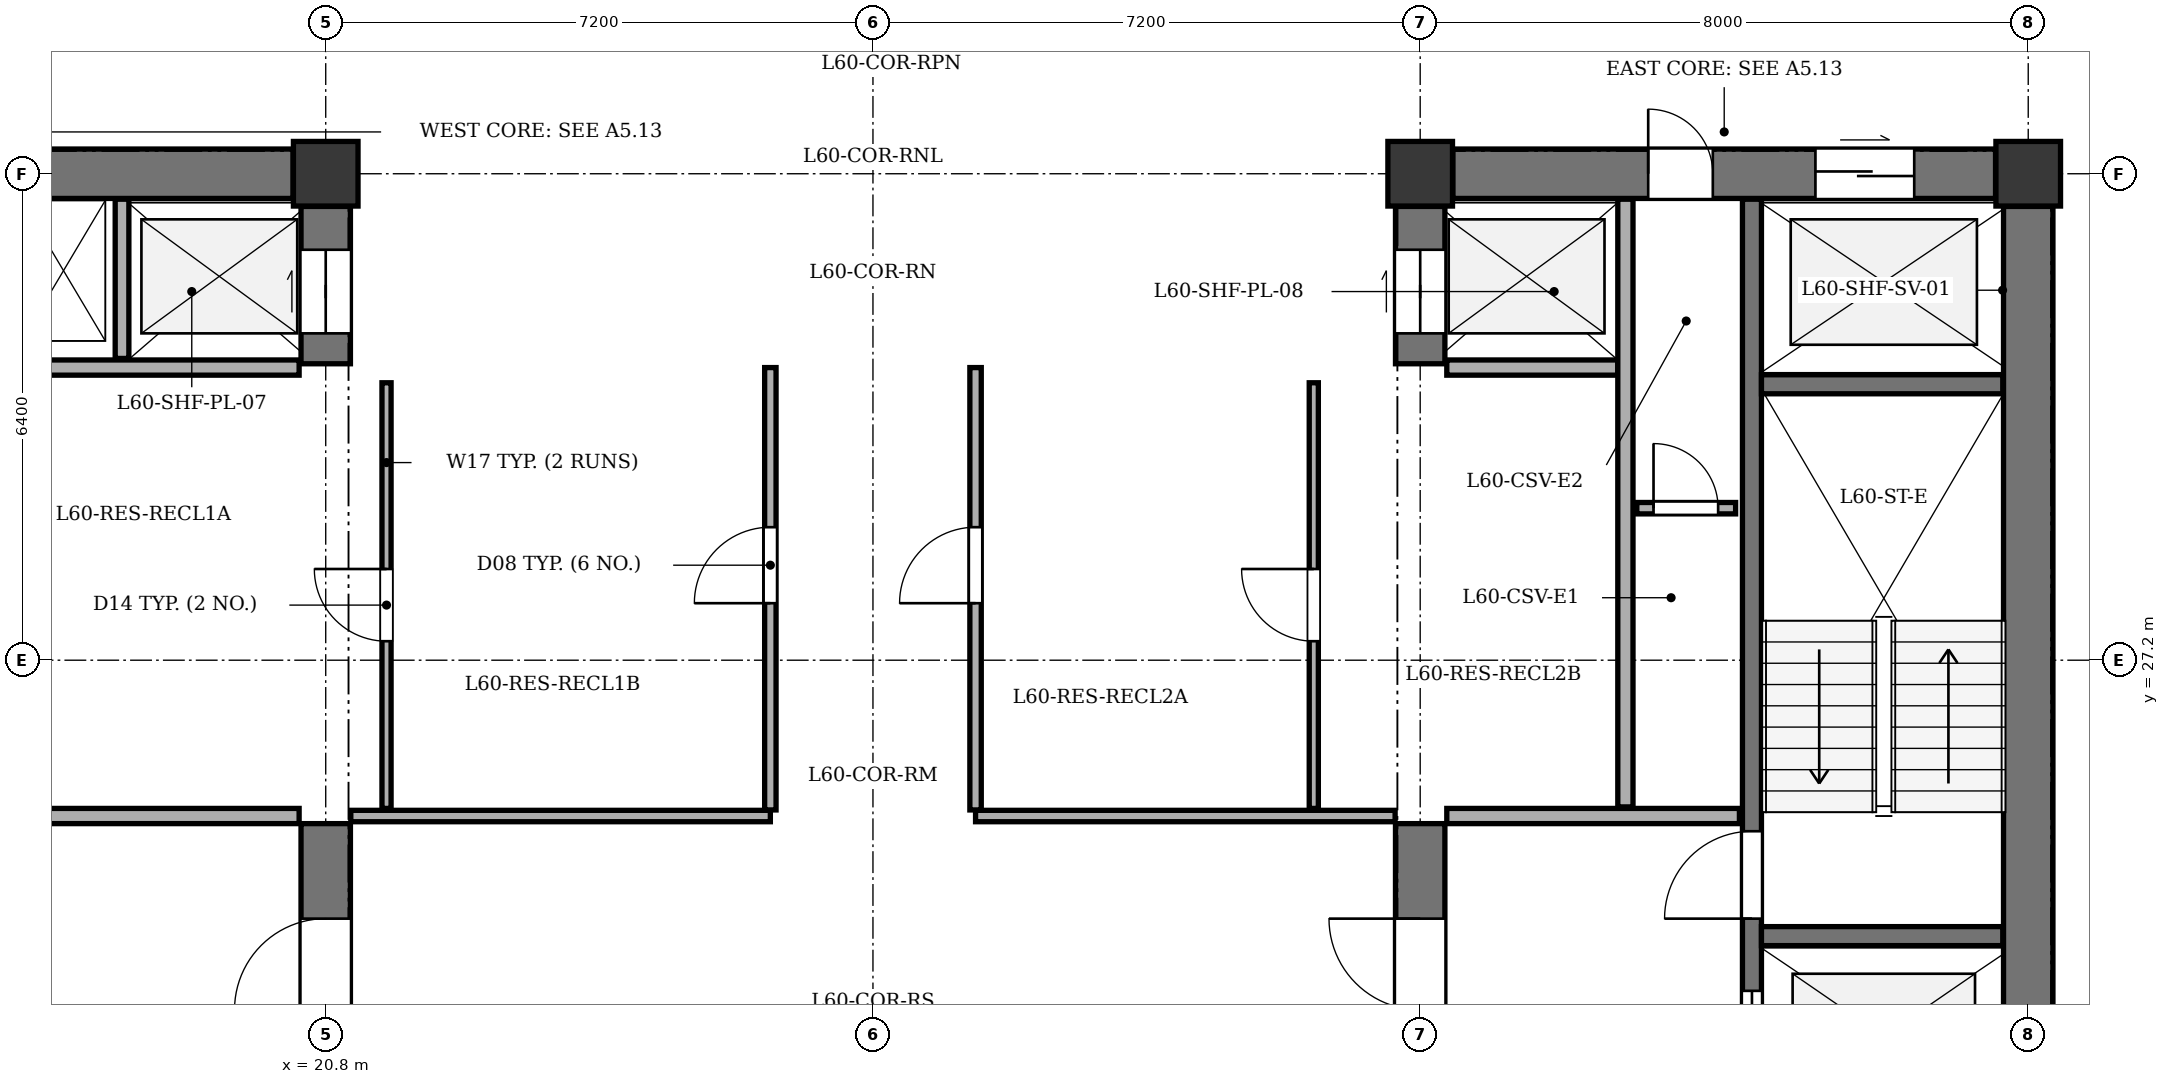
"""IFC4 building model, lengths in metres.
Left out: names, types, materials, properties, quantities, classifications, styles, units other than length and angle.
Written with IfcOpenShell. Run it as: python <this file> out.ifc"""

import sys

from ifc_helpers import new_model, si_unit, direction, frame, frame_2d, origin, origin_2d, place, context, subcontext, project, spatial, rectangle, extrude, element, fill, save


model = new_model("IFC4")
c1 = context("Model", 3, precision=1e-05, world=origin(), true_north=direction((0.0, 1.0)))
c2 = subcontext(c1, "Body", "Model", "MODEL_VIEW")
j1 = project(units=[si_unit("LENGTHUNIT", "METRE"), si_unit("PLANEANGLEUNIT", "RADIAN")], contexts=[c1])
p1 = place(None, origin())
s1 = spatial("IfcSite", under=j1, at=p1, CompositionType="ELEMENT")
p2 = place(p1, origin())
s2 = spatial("IfcBuilding", under=s1, at=p2, CompositionType="ELEMENT")
p3 = place(p2, frame((0.0, 0.0, 231.3)))
s3 = spatial("IfcBuildingStorey", under=s2, at=p3, CompositionType="ELEMENT", Elevation=231.3)
for number, where, z_axis, x_axis in (
    (1, (20.8, 33.6, 0.0), (0.0, 0.0, 1.0), (1.0, 0.0, 0.0)),
    (2, (35.2, 33.6, 0.0), (0.0, 0.0, 1.0), (1.0, 0.0, 0.0)),
    (3, (43.2, 33.6, 0.0), (0.0, 0.0, 1.0), (1.0, 0.0, 0.0)),
):
    element("IfcColumn", number, at=place(p3, frame(where, z_axis=z_axis, x_axis=x_axis)), inside=s3, PredefinedType="COLUMN", context=c2, shape_type="SweptSolid", body=[
        extrude(rectangle(XDim=0.85, YDim=0.85, at=origin_2d()), origin(), (0.0, 0.0, 1.0), 3.4),
    ])
p4 = place(p3, frame((13.23, 33.6, 0.0), z_axis=(0.0, 0.0, 1.0), x_axis=(1.0, 0.0, 0.0)))
e4 = element("IfcWall", 4, at=p4, inside=s3, PredefinedType="SHEAR", context=c2, shape_type="SweptSolid", body=[
    extrude(rectangle(XDim=7.14, YDim=0.65, at=frame_2d((3.57, 0.0))), origin(), (0.0, 0.0, 1.0), 3.1),
])
p5 = place(p4, frame((2.14, 0.0, 0.0)))
e5 = element("IfcOpeningElement", 5, at=p5, cuts=e4, PredefinedType="OPENING", context=c2, shape_type="SweptSolid", body=[
    extrude(rectangle(XDim=0.85, YDim=2.02, at=frame_2d((0.425, 1.01))), frame((0.0, 0.335, 0.0), z_axis=(0.0, -1.0, 0.0), x_axis=(1.0, 0.0, 0.0)), (0.0, 0.0, 1.0), 0.67),
])
p6 = place(p3, frame((20.8, 21.23, 0.0), z_axis=(0.0, 0.0, 1.0), x_axis=(0.0, 1.0, 0.0)))
e6 = element("IfcWall", 6, at=p6, inside=s3, PredefinedType="SHEAR", context=c2, shape_type="SweptSolid", body=[
    extrude(rectangle(XDim=3.82, YDim=0.65, at=frame_2d((1.91, 0.0))), origin(), (0.0, 0.0, 1.0), 3.1),
])
p7 = place(p6, frame((1.37, 0.0, 0.0)))
e7 = element("IfcOpeningElement", 7, at=p7, cuts=e6, PredefinedType="OPENING", context=c2, shape_type="SweptSolid", body=[
    extrude(rectangle(XDim=1.2, YDim=2.15, at=frame_2d((0.6, 1.075))), frame((0.0, 0.335, 0.0), z_axis=(0.0, -1.0, 0.0), x_axis=(1.0, 0.0, 0.0)), (0.0, 0.0, 1.0), 0.67),
])
p8 = place(p3, frame((20.8, 31.1, 0.0), z_axis=(0.0, 0.0, 1.0), x_axis=(0.0, 1.0, 0.0)))
e8 = element("IfcWall", 8, at=p8, inside=s3, PredefinedType="SHEAR", context=c2, shape_type="SweptSolid", body=[
    extrude(rectangle(XDim=2.07, YDim=0.65, at=frame_2d((1.035, 0.0))), origin(), (0.0, 0.0, 1.0), 3.1),
])
p9 = place(p8, frame((0.4, 0.0, 0.0)))
e9 = element("IfcOpeningElement", 9, at=p9, cuts=e8, PredefinedType="OPENING", context=c2, shape_type="SweptSolid", body=[
    extrude(rectangle(XDim=1.1, YDim=2.1, at=frame_2d((0.55, 1.05))), frame((0.0, 0.335, 0.0), z_axis=(0.0, -1.0, 0.0), x_axis=(1.0, 0.0, 0.0)), (0.0, 0.0, 1.0), 0.67),
])
for number, where, z_axis, x_axis in (
    (10, (16.6, 25.15, 0.0), (0.0, 0.0, 1.0), (1.0, 0.0, 0.0)),
    (11, (16.6, 31.05, 0.0), (0.0, 0.0, 1.0), (1.0, 0.0, 0.0)),
):
    element("IfcWall", number, at=place(p3, frame(where, z_axis=z_axis, x_axis=x_axis)), inside=s3, PredefinedType="SOLIDWALL", context=c2, shape_type="SweptSolid", body=[
        extrude(rectangle(XDim=3.85, YDim=0.2, at=frame_2d((1.925, 0.0))), origin(), (0.0, 0.0, 1.0), 3.1),
    ])
p10 = place(p3, frame((18.12, 31.17, 0.0), z_axis=(0.0, 0.0, 1.0), x_axis=(0.0, 1.0, 0.0)))
e12 = element("IfcWall", 12, at=p10, inside=s3, PredefinedType="PARTITIONING", context=c2, shape_type="SweptSolid", body=[
    extrude(rectangle(XDim=2.095, YDim=0.18, at=frame_2d((1.047, 0.0))), origin(), (0.0, 0.0, 1.0), 3.1),
])
p11 = place(p3, frame((43.2, 21.23, 0.0), z_axis=(0.0, 0.0, 1.0), x_axis=(0.0, 1.0, 0.0)))
e13 = element("IfcWall", 13, at=p11, inside=s3, PredefinedType="SHEAR", context=c2, shape_type="SweptSolid", body=[
    extrude(rectangle(XDim=11.94, YDim=0.65, at=frame_2d((5.97, 0.0))), origin(), (0.0, 0.0, 1.0), 3.1),
])
p12 = place(p3, frame((35.63, 33.6, 0.0), z_axis=(0.0, 0.0, 1.0), x_axis=(1.0, 0.0, 0.0)))
e14 = element("IfcWall", 14, at=p12, inside=s3, PredefinedType="SHEAR", context=c2, shape_type="SweptSolid", body=[
    extrude(rectangle(XDim=7.14, YDim=0.65, at=frame_2d((3.57, 0.0))), origin(), (0.0, 0.0, 1.0), 3.1),
])
p13 = place(p12, frame((4.77, 0.0, 0.0)))
e15 = element("IfcOpeningElement", 15, at=p13, cuts=e14, PredefinedType="OPENING", context=c2, shape_type="SweptSolid", body=[
    extrude(rectangle(XDim=1.3, YDim=2.15, at=frame_2d((0.65, 1.075))), frame((0.0, 0.335, 0.0), z_axis=(0.0, -1.0, 0.0), x_axis=(1.0, 0.0, 0.0)), (0.0, 0.0, 1.0), 0.67),
])
p14 = place(p12, frame((2.57, 0.0, 0.0)))
e16 = element("IfcOpeningElement", 16, at=p14, cuts=e14, PredefinedType="OPENING", context=c2, shape_type="SweptSolid", body=[
    extrude(rectangle(XDim=0.85, YDim=2.02, at=frame_2d((0.425, 1.01))), frame((0.0, 0.335, 0.0), z_axis=(0.0, -1.0, 0.0), x_axis=(1.0, 0.0, 0.0)), (0.0, 0.0, 1.0), 0.67),
])
p15 = place(p3, frame((35.2, 21.23, 0.0), z_axis=(0.0, 0.0, 1.0), x_axis=(0.0, 1.0, 0.0)))
e17 = element("IfcWall", 17, at=p15, inside=s3, PredefinedType="SHEAR", context=c2, shape_type="SweptSolid", body=[
    extrude(rectangle(XDim=3.82, YDim=0.65, at=frame_2d((1.91, 0.0))), origin(), (0.0, 0.0, 1.0), 3.1),
])
p16 = place(p15, frame((1.37, 0.0, 0.0)))
e18 = element("IfcOpeningElement", 18, at=p16, cuts=e17, PredefinedType="OPENING", context=c2, shape_type="SweptSolid", body=[
    extrude(rectangle(XDim=1.2, YDim=2.15, at=frame_2d((0.6, 1.075))), frame((0.0, 0.335, 0.0), z_axis=(0.0, -1.0, 0.0), x_axis=(1.0, 0.0, 0.0)), (0.0, 0.0, 1.0), 0.67),
])
p17 = place(p3, frame((35.2, 31.1, 0.0), z_axis=(0.0, 0.0, 1.0), x_axis=(0.0, 1.0, 0.0)))
e19 = element("IfcWall", 19, at=p17, inside=s3, PredefinedType="SHEAR", context=c2, shape_type="SweptSolid", body=[
    extrude(rectangle(XDim=2.07, YDim=0.65, at=frame_2d((1.035, 0.0))), origin(), (0.0, 0.0, 1.0), 3.1),
])
p18 = place(p17, frame((0.4, 0.0, 0.0)))
e20 = element("IfcOpeningElement", 20, at=p18, cuts=e19, PredefinedType="OPENING", context=c2, shape_type="SweptSolid", body=[
    extrude(rectangle(XDim=1.1, YDim=2.1, at=frame_2d((0.55, 1.05))), frame((0.0, 0.335, 0.0), z_axis=(0.0, -1.0, 0.0), x_axis=(1.0, 0.0, 0.0)), (0.0, 0.0, 1.0), 0.67),
])
p19 = place(p3, frame((39.565, 21.135, 0.0), z_axis=(0.0, 0.0, 1.0), x_axis=(0.0, 1.0, 0.0)))
e21 = element("IfcWall", 21, at=p19, inside=s3, PredefinedType="SHEAR", context=c2, shape_type="SweptSolid", body=[
    extrude(rectangle(XDim=12.13, YDim=0.25, at=frame_2d((6.065, 0.0))), origin(), (0.0, 0.0, 1.0), 3.1),
])
p20 = place(p19, frame((0.515, 0.0, 0.0)))
e22 = element("IfcOpeningElement", 22, at=p20, cuts=e21, PredefinedType="OPENING", context=c2, shape_type="SweptSolid", body=[
    extrude(rectangle(XDim=1.2, YDim=2.15, at=frame_2d((0.6, 1.075))), frame((0.0, 0.135, 0.0), z_axis=(0.0, -1.0, 0.0), x_axis=(1.0, 0.0, 0.0)), (0.0, 0.0, 1.0), 0.27),
])
p21 = place(p19, frame((2.665, 0.0, 0.0)))
e23 = element("IfcOpeningElement", 23, at=p21, cuts=e21, PredefinedType="OPENING", context=c2, shape_type="SweptSolid", body=[
    extrude(rectangle(XDim=1.15, YDim=2.15, at=frame_2d((0.575, 1.075))), frame((0.0, 0.135, 0.0), z_axis=(0.0, -1.0, 0.0), x_axis=(1.0, 0.0, 0.0)), (0.0, 0.0, 1.0), 0.27),
])
for number, where, z_axis, x_axis in (
    (24, (39.69, 23.57, 0.0), (0.0, 0.0, 1.0), (1.0, 0.0, 0.0)),
    (25, (39.69, 30.83, 0.0), (0.0, 0.0, 1.0), (1.0, 0.0, 0.0)),
):
    element("IfcWall", number, at=place(p3, frame(where, z_axis=z_axis, x_axis=x_axis)), inside=s3, PredefinedType="SHEAR", context=c2, shape_type="SweptSolid", body=[
        extrude(rectangle(XDim=3.175, YDim=0.25, at=frame_2d((1.587, 0.0))), origin(), (0.0, 0.0, 1.0), 3.1),
    ])
p22 = place(p3, frame((35.55, 25.15, 0.0), z_axis=(0.0, 0.0, 1.0), x_axis=(1.0, 0.0, 0.0)))
e26 = element("IfcWall", 26, at=p22, inside=s3, PredefinedType="SOLIDWALL", context=c2, shape_type="SweptSolid", body=[
    extrude(rectangle(XDim=3.85, YDim=0.2, at=frame_2d((1.925, 0.0))), origin(), (0.0, 0.0, 1.0), 3.1),
])
p23 = place(p3, frame((35.55, 31.05, 0.0), z_axis=(0.0, 0.0, 1.0), x_axis=(1.0, 0.0, 0.0)))
e27 = element("IfcWall", 27, at=p23, inside=s3, PredefinedType="SOLIDWALL", context=c2, shape_type="SweptSolid", body=[
    extrude(rectangle(XDim=2.25, YDim=0.2, at=frame_2d((1.125, 0.0))), origin(), (0.0, 0.0, 1.0), 3.1),
])
p24 = place(p3, frame((37.9, 25.27, 0.0), z_axis=(0.0, 0.0, 1.0), x_axis=(0.0, 1.0, 0.0)))
e28 = element("IfcWall", 28, at=p24, inside=s3, PredefinedType="SOLIDWALL", context=c2, shape_type="SweptSolid", body=[
    extrude(rectangle(XDim=7.995, YDim=0.2, at=frame_2d((3.998, 0.0))), origin(), (0.0, 0.0, 1.0), 3.1),
])
p25 = place(p3, frame((38.05, 29.2, 0.0), z_axis=(0.0, 0.0, 1.0), x_axis=(1.0, 0.0, 0.0)))
e29 = element("IfcWall", 29, at=p25, inside=s3, PredefinedType="PARTITIONING", context=c2, shape_type="SweptSolid", body=[
    extrude(rectangle(XDim=1.3, YDim=0.15, at=frame_2d((0.65, 0.0))), origin(), (0.0, 0.0, 1.0), 3.1),
])
p26 = place(p25, frame((0.22, 0.0, 0.0)))
e30 = element("IfcOpeningElement", 30, at=p26, cuts=e29, PredefinedType="OPENING", context=c2, shape_type="SweptSolid", body=[
    extrude(rectangle(XDim=0.85, YDim=2.02, at=frame_2d((0.425, 1.01))), frame((0.0, 0.085, 0.0), z_axis=(0.0, -1.0, 0.0), x_axis=(1.0, 0.0, 0.0)), (0.0, 0.0, 1.0), 0.17),
])
for number, where, z_axis, x_axis in (
    (31, (21.13, 25.15, 0.0), (0.0, 0.0, 1.0), (1.0, 0.0, 0.0)),
    (32, (29.35, 25.15, 0.0), (0.0, 0.0, 1.0), (1.0, 0.0, 0.0)),
):
    element("IfcWall", number, at=place(p3, frame(where, z_axis=z_axis, x_axis=x_axis)), inside=s3, PredefinedType="PARTITIONING", context=c2, shape_type="SweptSolid", body=[
        extrude(rectangle(XDim=5.52, YDim=0.15, at=frame_2d((2.76, 0.0))), origin(), (0.0, 0.0, 1.0), 3.1),
    ])
p27 = place(p3, frame((26.65, 25.23, 0.0), z_axis=(0.0, 0.0, 1.0), x_axis=(0.0, 1.0, 0.0)))
e33 = element("IfcWall", 33, at=p27, inside=s3, PredefinedType="PARTITIONING", context=c2, shape_type="SweptSolid", body=[
    extrude(rectangle(XDim=5.82, YDim=0.15, at=frame_2d((2.91, 0.0))), origin(), (0.0, 0.0, 1.0), 3.1),
])
p28 = place(p27, frame((2.72, 0.0, 0.0)))
e34 = element("IfcOpeningElement", 34, at=p28, cuts=e33, PredefinedType="OPENING", context=c2, shape_type="SweptSolid", body=[
    extrude(rectangle(XDim=1.0, YDim=2.1, at=frame_2d((0.5, 1.05))), frame((0.0, 0.085, 0.0), z_axis=(0.0, -1.0, 0.0), x_axis=(1.0, 0.0, 0.0)), (0.0, 0.0, 1.0), 0.17),
])
p29 = place(p3, frame((21.6, 25.25, 0.0), z_axis=(0.0, 0.0, 1.0), x_axis=(0.0, 1.0, 0.0)))
e35 = element("IfcWall", 35, at=p29, inside=s3, PredefinedType="PARTITIONING", context=c2, shape_type="SweptSolid", body=[
    extrude(rectangle(XDim=5.6, YDim=0.12, at=frame_2d((2.8, 0.0))), origin(), (0.0, 0.0, 1.0), 3.1),
])
p30 = place(p29, frame((2.2, 0.0, 0.0)))
e36 = element("IfcOpeningElement", 36, at=p30, cuts=e35, PredefinedType="OPENING", context=c2, shape_type="SweptSolid", body=[
    extrude(rectangle(XDim=0.95, YDim=2.1, at=frame_2d((0.475, 1.05))), frame((0.0, 0.07, 0.0), z_axis=(0.0, -1.0, 0.0), x_axis=(1.0, 0.0, 0.0)), (0.0, 0.0, 1.0), 0.14),
])
p31 = place(p3, frame((29.35, 25.23, 0.0), z_axis=(0.0, 0.0, 1.0), x_axis=(0.0, 1.0, 0.0)))
e37 = element("IfcWall", 37, at=p31, inside=s3, PredefinedType="PARTITIONING", context=c2, shape_type="SweptSolid", body=[
    extrude(rectangle(XDim=5.82, YDim=0.15, at=frame_2d((2.91, 0.0))), origin(), (0.0, 0.0, 1.0), 3.1),
])
p32 = place(p31, frame((2.72, 0.0, 0.0)))
e38 = element("IfcOpeningElement", 38, at=p32, cuts=e37, PredefinedType="OPENING", context=c2, shape_type="SweptSolid", body=[
    extrude(rectangle(XDim=1.0, YDim=2.1, at=frame_2d((0.5, 1.05))), frame((0.0, 0.085, 0.0), z_axis=(0.0, -1.0, 0.0), x_axis=(1.0, 0.0, 0.0)), (0.0, 0.0, 1.0), 0.17),
])
p33 = place(p3, frame((33.8, 25.25, 0.0), z_axis=(0.0, 0.0, 1.0), x_axis=(0.0, 1.0, 0.0)))
e39 = element("IfcWall", 39, at=p33, inside=s3, PredefinedType="PARTITIONING", context=c2, shape_type="SweptSolid", body=[
    extrude(rectangle(XDim=5.6, YDim=0.12, at=frame_2d((2.8, 0.0))), origin(), (0.0, 0.0, 1.0), 3.1),
])
p34 = place(p33, frame((2.2, 0.0, 0.0)))
e40 = element("IfcOpeningElement", 40, at=p34, cuts=e39, PredefinedType="OPENING", context=c2, shape_type="SweptSolid", body=[
    extrude(rectangle(XDim=0.95, YDim=2.1, at=frame_2d((0.475, 1.05))), frame((0.0, 0.07, 0.0), z_axis=(0.0, -1.0, 0.0), x_axis=(1.0, 0.0, 0.0)), (0.0, 0.0, 1.0), 0.14),
])
p35 = place(p7, origin())
e41 = element("IfcDoor", 41, at=p35, inside=s3, OperationType="SINGLE_SWING_LEFT", PredefinedType="DOOR", context=c2, shape_type="SweptSolid", body=[
    extrude(rectangle(XDim=1.2, YDim=2.15, at=frame_2d((0.6, 1.075))), frame((0.0, 0.025, 0.0), z_axis=(0.0, -1.0, 0.0), x_axis=(1.0, 0.0, 0.0)), (0.0, 0.0, 1.0), 0.05),
])
fill(e7, e41)
p36 = place(p9, origin())
e42 = element("IfcDoor", 42, at=p36, inside=s3, OperationType="DOUBLE_DOOR_SLIDING", PredefinedType="DOOR", context=c2, shape_type="SweptSolid", body=[
    extrude(rectangle(XDim=1.1, YDim=2.1, at=frame_2d((0.55, 1.05))), frame((0.0, 0.025, 0.0), z_axis=(0.0, -1.0, 0.0), x_axis=(1.0, 0.0, 0.0)), (0.0, 0.0, 1.0), 0.05),
])
fill(e9, e42)
p37 = place(p13, origin())
e43 = element("IfcDoor", 43, at=p37, inside=s3, OperationType="DOUBLE_DOOR_SLIDING", PredefinedType="DOOR", context=c2, shape_type="SweptSolid", body=[
    extrude(rectangle(XDim=1.3, YDim=2.15, at=frame_2d((0.65, 1.075))), frame((0.0, 0.025, 0.0), z_axis=(0.0, -1.0, 0.0), x_axis=(1.0, 0.0, 0.0)), (0.0, 0.0, 1.0), 0.05),
])
fill(e15, e43)
p38 = place(p14, origin())
e44 = element("IfcDoor", 44, at=p38, inside=s3, OperationType="SINGLE_SWING_LEFT", PredefinedType="DOOR", context=c2, shape_type="SweptSolid", body=[
    extrude(rectangle(XDim=0.85, YDim=2.02, at=frame_2d((0.425, 1.01))), frame((0.0, 0.025, 0.0), z_axis=(0.0, -1.0, 0.0), x_axis=(1.0, 0.0, 0.0)), (0.0, 0.0, 1.0), 0.05),
])
fill(e16, e44)
p39 = place(p16, origin())
e45 = element("IfcDoor", 45, at=p39, inside=s3, OperationType="SINGLE_SWING_RIGHT", PredefinedType="DOOR", context=c2, shape_type="SweptSolid", body=[
    extrude(rectangle(XDim=1.2, YDim=2.15, at=frame_2d((0.6, 1.075))), frame((0.0, 0.025, 0.0), z_axis=(0.0, -1.0, 0.0), x_axis=(1.0, 0.0, 0.0)), (0.0, 0.0, 1.0), 0.05),
])
fill(e18, e45)
p40 = place(p18, origin())
e46 = element("IfcDoor", 46, at=p40, inside=s3, OperationType="DOUBLE_DOOR_SLIDING", PredefinedType="DOOR", context=c2, shape_type="SweptSolid", body=[
    extrude(rectangle(XDim=1.1, YDim=2.1, at=frame_2d((0.55, 1.05))), frame((0.0, 0.025, 0.0), z_axis=(0.0, -1.0, 0.0), x_axis=(1.0, 0.0, 0.0)), (0.0, 0.0, 1.0), 0.05),
])
fill(e20, e46)
p41 = place(p20, origin())
e47 = element("IfcDoor", 47, at=p41, inside=s3, OperationType="DOUBLE_DOOR_SLIDING", PredefinedType="DOOR", context=c2, shape_type="SweptSolid", body=[
    extrude(rectangle(XDim=1.2, YDim=2.15, at=frame_2d((0.6, 1.075))), frame((0.0, 0.025, 0.0), z_axis=(0.0, -1.0, 0.0), x_axis=(1.0, 0.0, 0.0)), (0.0, 0.0, 1.0), 0.05),
])
fill(e22, e47)
p42 = place(p21, origin())
e48 = element("IfcDoor", 48, at=p42, inside=s3, OperationType="SINGLE_SWING_LEFT", PredefinedType="DOOR", context=c2, shape_type="SweptSolid", body=[
    extrude(rectangle(XDim=1.15, YDim=2.15, at=frame_2d((0.575, 1.075))), frame((0.0, 0.025, 0.0), z_axis=(0.0, -1.0, 0.0), x_axis=(1.0, 0.0, 0.0)), (0.0, 0.0, 1.0), 0.05),
])
fill(e23, e48)
p43 = place(p26, origin())
e49 = element("IfcDoor", 49, at=p43, inside=s3, OperationType="SINGLE_SWING_LEFT", PredefinedType="DOOR", context=c2, shape_type="SweptSolid", body=[
    extrude(rectangle(XDim=0.85, YDim=2.02, at=frame_2d((0.425, 1.01))), frame((0.0, 0.025, 0.0), z_axis=(0.0, -1.0, 0.0), x_axis=(1.0, 0.0, 0.0)), (0.0, 0.0, 1.0), 0.05),
])
fill(e30, e49)
p44 = place(p30, origin())
e50 = element("IfcDoor", 50, at=p44, inside=s3, OperationType="SINGLE_SWING_RIGHT", PredefinedType="DOOR", context=c2, shape_type="SweptSolid", body=[
    extrude(rectangle(XDim=0.95, YDim=2.1, at=frame_2d((0.475, 1.05))), frame((0.0, 0.025, 0.0), z_axis=(0.0, -1.0, 0.0), x_axis=(1.0, 0.0, 0.0)), (0.0, 0.0, 1.0), 0.05),
])
fill(e36, e50)
p45 = place(p28, origin())
e51 = element("IfcDoor", 51, at=p45, inside=s3, OperationType="SINGLE_SWING_LEFT", PredefinedType="DOOR", context=c2, shape_type="SweptSolid", body=[
    extrude(rectangle(XDim=1.0, YDim=2.1, at=frame_2d((0.5, 1.05))), frame((0.0, 0.025, 0.0), z_axis=(0.0, -1.0, 0.0), x_axis=(1.0, 0.0, 0.0)), (0.0, 0.0, 1.0), 0.05),
])
fill(e34, e51)
p46 = place(p34, origin())
e52 = element("IfcDoor", 52, at=p46, inside=s3, OperationType="SINGLE_SWING_RIGHT", PredefinedType="DOOR", context=c2, shape_type="SweptSolid", body=[
    extrude(rectangle(XDim=0.95, YDim=2.1, at=frame_2d((0.475, 1.05))), frame((0.0, 0.025, 0.0), z_axis=(0.0, -1.0, 0.0), x_axis=(1.0, 0.0, 0.0)), (0.0, 0.0, 1.0), 0.05),
])
fill(e40, e52)
p47 = place(p32, origin())
e53 = element("IfcDoor", 53, at=p47, inside=s3, OperationType="SINGLE_SWING_LEFT", PredefinedType="DOOR", context=c2, shape_type="SweptSolid", body=[
    extrude(rectangle(XDim=1.0, YDim=2.1, at=frame_2d((0.5, 1.05))), frame((0.0, 0.025, 0.0), z_axis=(0.0, -1.0, 0.0), x_axis=(1.0, 0.0, 0.0)), (0.0, 0.0, 1.0), 0.05),
])
fill(e38, e53)
save(model, sys.argv[1])
